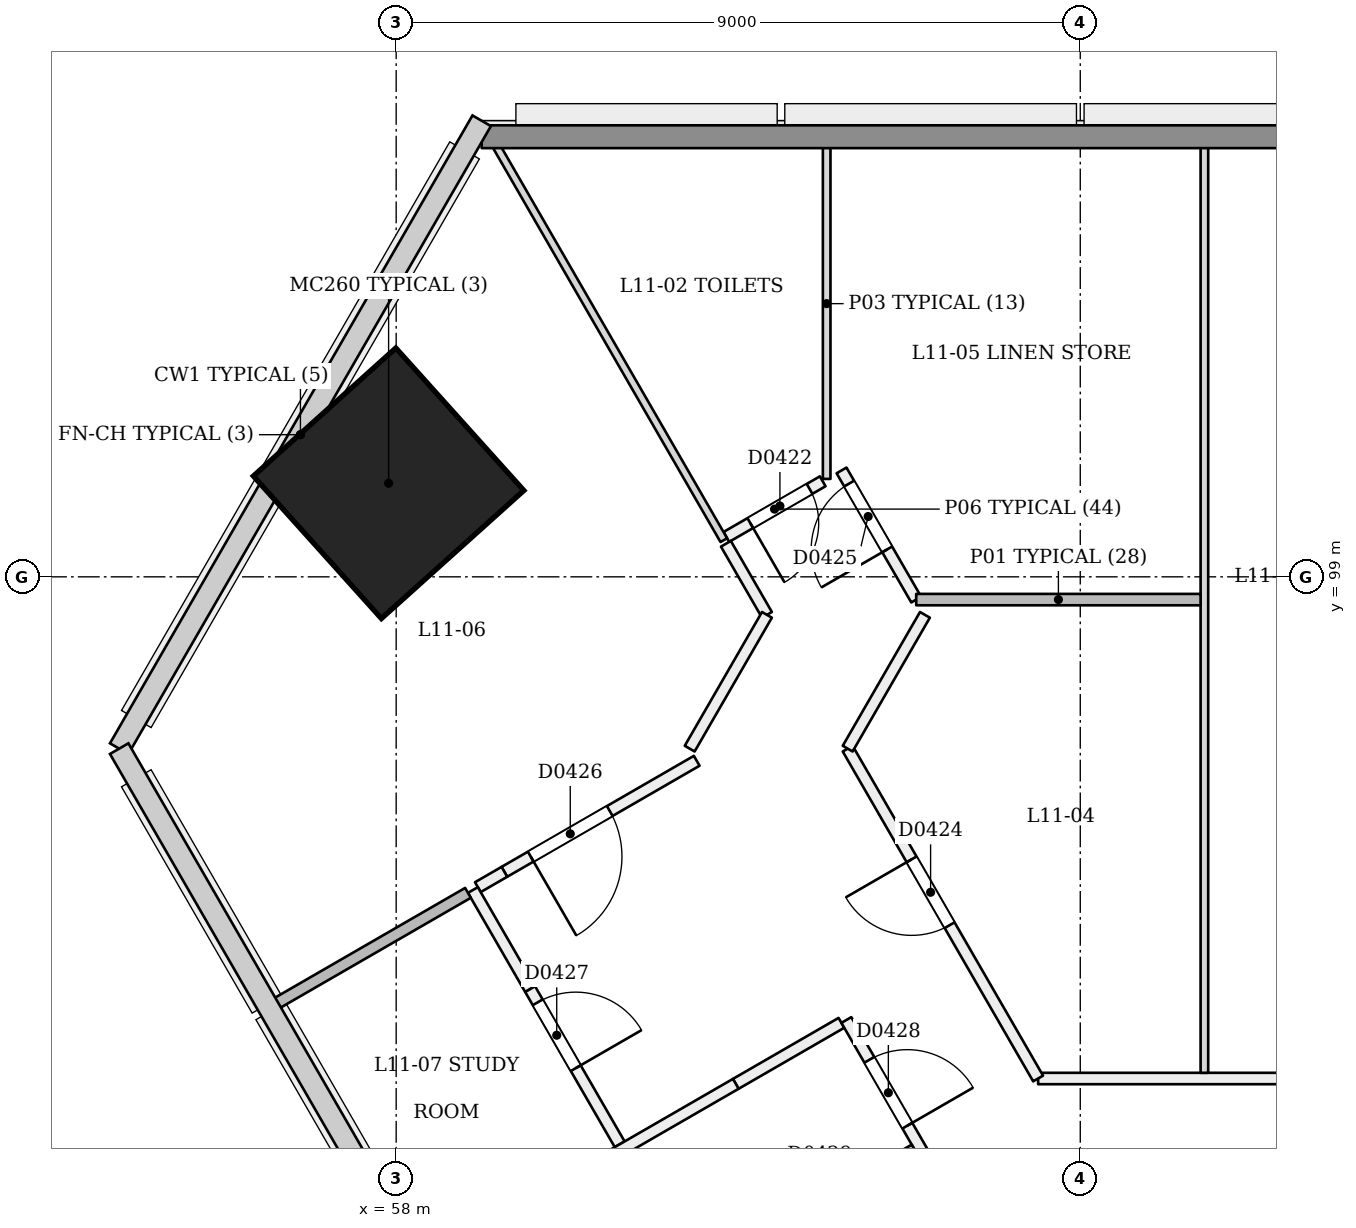
"""IFC4 building model, lengths in metres.
Left out: names, types, materials, properties, quantities, classifications, styles, units other than length and angle.
Written with IfcOpenShell. Run it as: python <this file> out.ifc"""

import sys

from ifc_helpers import new_model, si_unit, direction, frame, frame_2d, origin, origin_2d, place, context, subcontext, project, spatial, rectangle, extrude, element, fill, save


model = new_model("IFC4")
c1 = context("Model", 3, precision=1e-05, world=origin(), true_north=direction((0.0, 1.0)))
c2 = subcontext(c1, "Body", "Model", "MODEL_VIEW")
j1 = project(units=[si_unit("LENGTHUNIT", "METRE"), si_unit("PLANEANGLEUNIT", "RADIAN")], contexts=[c1])
p1 = place(None, origin())
s1 = spatial("IfcSite", under=j1, at=p1, CompositionType="ELEMENT")
p2 = place(p1, origin())
s2 = spatial("IfcBuilding", under=s1, at=p2, CompositionType="ELEMENT")
p3 = place(p2, frame((0.0, 0.0, 48.6)))
s3 = spatial("IfcBuildingStorey", under=s2, at=p3, CompositionType="ELEMENT", Elevation=48.6)
p4 = place(p3, frame((57.866, 100.22, 0.0), z_axis=(0.028403721265, 0.009287135593, 0.999553389135), x_axis=(-0.866197515162, 0.499302374824, 0.019975065005)))
e1 = element("IfcColumn", 1, at=p4, inside=s3, PredefinedType="COLUMN", context=c2, shape_type="SweptSolid", body=[
    extrude(rectangle(XDim=2.52, YDim=2.52, at=origin_2d()), origin(), (0.0, 0.0, 1.0), 3.602),
])
p5 = place(p3, frame((63.612, 100.257, 0.0), z_axis=(0.0, 0.0, 1.0), x_axis=(-0.866038398192, -0.499977492351, 0.0)))
e2 = element("IfcWall", 2, at=p5, inside=s3, PredefinedType="PARTITIONING", context=c2, shape_type="SweptSolid", body=[
    extrude(rectangle(XDim=1.464, YDim=0.15, at=frame_2d((0.732, 0.0))), origin(), (0.0, 0.0, 1.0), 3.1),
])
p6 = place(p5, frame((0.2, 0.0, 0.0)))
e3 = element("IfcOpeningElement", 3, at=p6, cuts=e2, PredefinedType="OPENING", context=c2, shape_type="SweptSolid", body=[
    extrude(rectangle(XDim=0.9, YDim=2.1, at=frame_2d((0.45, 1.05))), frame((0.0, 0.085, 0.0), z_axis=(0.0, -1.0, 0.0), x_axis=(1.0, 0.0, 0.0)), (0.0, 0.0, 1.0), 0.171),
])
p7 = place(p3, frame((70.125, 92.4, 0.0), z_axis=(0.0, 0.0, 1.0), x_axis=(-1.0, 0.0, 0.0)))
e4 = element("IfcWall", 4, at=p7, inside=s3, PredefinedType="PARTITIONING", context=c2, shape_type="SweptSolid", body=[
    extrude(rectangle(XDim=3.679, YDim=0.15, at=frame_2d((1.84, 0.0))), origin(), (0.0, 0.0, 1.0), 3.1),
])
p8 = place(p3, frame((66.446, 92.4, 0.0), z_axis=(0.0, 0.0, 1.0), x_axis=(-0.500000789788, 0.8660249478, 0.0)))
e5 = element("IfcWall", 5, at=p8, inside=s3, PredefinedType="PARTITIONING", context=c2, shape_type="SweptSolid", body=[
    extrude(rectangle(XDim=5.011, YDim=0.15, at=frame_2d((2.506, 0.0))), origin(), (0.0, 0.0, 1.0), 3.1),
])
p9 = place(p8, frame((2.329, 0.0, 0.0)))
e6 = element("IfcOpeningElement", 6, at=p9, cuts=e5, PredefinedType="OPENING", context=c2, shape_type="SweptSolid", body=[
    extrude(rectangle(XDim=1.0, YDim=2.1, at=frame_2d((0.5, 1.05))), frame((0.0, 0.085, 0.0), z_axis=(0.0, -1.0, 0.0), x_axis=(1.0, 0.0, 0.0)), (0.0, 0.0, 1.0), 0.171),
])
p10 = place(p3, frame((63.94, 96.74, 0.0), z_axis=(0.0, 0.0, 1.0), x_axis=(0.50002743572, 0.866009563185, 0.0)))
e7 = element("IfcWall", 7, at=p10, inside=s3, PredefinedType="PARTITIONING", context=c2, shape_type="SweptSolid", body=[
    extrude(rectangle(XDim=2.033, YDim=0.15, at=frame_2d((1.016, 0.0))), origin(), (0.0, 0.0, 1.0), 3.1),
])
p11 = place(p3, frame((64.842, 98.7, 0.0), z_axis=(0.0, 0.0, 1.0), x_axis=(-0.500379133502, 0.865806400274, 0.0)))
e8 = element("IfcWall", 8, at=p11, inside=s3, PredefinedType="PARTITIONING", context=c2, shape_type="SweptSolid", body=[
    extrude(rectangle(XDim=1.963, YDim=0.15, at=frame_2d((0.981, 0.0))), origin(), (0.0, 0.0, 1.0), 3.1),
])
p12 = place(p11, frame((0.763, 0.0, 0.0)))
e9 = element("IfcOpeningElement", 9, at=p12, cuts=e8, PredefinedType="OPENING", context=c2, shape_type="SweptSolid", body=[
    extrude(rectangle(XDim=1.0, YDim=2.1, at=frame_2d((0.5, 1.05))), frame((0.0, 0.085, 0.0), z_axis=(0.0, -1.0, 0.0), x_axis=(1.0, 0.0, 0.0)), (0.0, 0.0, 1.0), 0.171),
])
p13 = place(p3, frame((62.338, 99.435, 0.0), z_axis=(0.0, 0.0, 1.0), x_axis=(0.499957341738, -0.866050031143, 0.0)))
e10 = element("IfcWall", 10, at=p13, inside=s3, PredefinedType="PARTITIONING", context=c2, shape_type="SweptSolid", body=[
    extrude(rectangle(XDim=1.08, YDim=0.15, at=frame_2d((0.54, 0.0))), origin(), (0.0, 0.0, 1.0), 3.1),
])
p14 = place(p3, frame((62.878, 98.5, 0.0), z_axis=(0.0, 0.0, 1.0), x_axis=(-0.50002743572, -0.866009563185, 0.0)))
e11 = element("IfcWall", 11, at=p14, inside=s3, PredefinedType="PARTITIONING", context=c2, shape_type="SweptSolid", body=[
    extrude(rectangle(XDim=2.033, YDim=0.15, at=frame_2d((1.016, 0.0))), origin(), (0.0, 0.0, 1.0), 3.1),
])
p15 = place(p3, frame((61.954, 96.58, 0.0), z_axis=(0.0, 0.0, 1.0), x_axis=(-0.866013036001, -0.500021421018, 0.0)))
e12 = element("IfcWall", 12, at=p15, inside=s3, PredefinedType="PARTITIONING", context=c2, shape_type="SweptSolid", body=[
    extrude(rectangle(XDim=2.922, YDim=0.15, at=frame_2d((1.461, 0.0))), origin(), (0.0, 0.0, 1.0), 3.1),
])
p16 = place(p15, frame((1.321, 0.0, 0.0)))
e13 = element("IfcOpeningElement", 13, at=p16, cuts=e12, PredefinedType="OPENING", context=c2, shape_type="SweptSolid", body=[
    extrude(rectangle(XDim=1.2, YDim=2.1, at=frame_2d((0.6, 1.05))), frame((0.0, 0.085, 0.0), z_axis=(0.0, -1.0, 0.0), x_axis=(1.0, 0.0, 0.0)), (0.0, 0.0, 1.0), 0.171),
])
p17 = place(p3, frame((59.424, 95.119, 0.0), z_axis=(0.0, 0.0, 1.0), x_axis=(-0.866074730264, -0.499914554297, 0.0)))
e14 = element("IfcWall", 14, at=p17, inside=s3, PredefinedType="PARTITIONING", context=c2, shape_type="SweptSolid", body=[
    extrude(rectangle(XDim=0.403, YDim=0.15, at=frame_2d((0.202, 0.0))), origin(), (0.0, 0.0, 1.0), 2.6),
])
p18 = place(p3, frame((59.009, 94.88, 0.0), z_axis=(0.0, 0.0, 1.0), x_axis=(0.500045262687, -0.865999269783, 0.0)))
e15 = element("IfcWall", 15, at=p18, inside=s3, PredefinedType="PARTITIONING", context=c2, shape_type="SweptSolid", body=[
    extrude(rectangle(XDim=1.506, YDim=0.15, at=frame_2d((0.753, 0.0))), origin(), (0.0, 0.0, 1.0), 2.6),
])
p19 = place(p3, frame((59.762, 93.576, 0.0), z_axis=(0.0, 0.0, 1.0), x_axis=(0.500027327967, -0.8660096254, 0.0)))
e16 = element("IfcWall", 16, at=p19, inside=s3, PredefinedType="PARTITIONING", context=c2, shape_type="SweptSolid", body=[
    extrude(rectangle(XDim=2.357, YDim=0.15, at=frame_2d((1.178, 0.0))), origin(), (0.0, 0.0, 1.0), 3.1),
])
p20 = place(p19, frame((0.2, 0.0, 0.0)))
e17 = element("IfcOpeningElement", 17, at=p20, cuts=e16, PredefinedType="OPENING", context=c2, shape_type="SweptSolid", body=[
    extrude(rectangle(XDim=1.0, YDim=2.1, at=frame_2d((0.5, 1.05))), frame((0.0, 0.085, 0.0), z_axis=(0.0, -1.0, 0.0), x_axis=(1.0, 0.0, 0.0)), (0.0, 0.0, 1.0), 0.171),
])
p21 = place(p3, frame((62.468, 92.33, 0.0), z_axis=(0.0, 0.0, 1.0), x_axis=(0.866053882819, 0.499950669621, 0.0)))
e18 = element("IfcWall", 18, at=p21, inside=s3, PredefinedType="PARTITIONING", context=c2, shape_type="SweptSolid", body=[
    extrude(rectangle(XDim=1.605, YDim=0.15, at=frame_2d((0.803, 0.0))), origin(), (0.0, 0.0, 1.0), 3.1),
])
p22 = place(p3, frame((63.923, 93.17, 0.0), z_axis=(0.0, 0.0, 1.0), x_axis=(0.500002225217, -0.866024119051, 0.0)))
e19 = element("IfcWall", 19, at=p22, inside=s3, PredefinedType="PARTITIONING", context=c2, shape_type="SweptSolid", body=[
    extrude(rectangle(XDim=38.6, YDim=0.15, at=frame_2d((19.3, 0.0))), origin(), (0.0, 0.0, 1.0), 2.7),
])
p23 = place(p22, frame((0.605, 0.0, 0.0)))
e20 = element("IfcOpeningElement", 20, at=p23, cuts=e19, PredefinedType="OPENING", context=c2, shape_type="SweptSolid", body=[
    extrude(rectangle(XDim=1.0, YDim=2.1, at=frame_2d((0.5, 1.05))), frame((0.0, 0.085, 0.0), z_axis=(0.0, -1.0, 0.0), x_axis=(1.0, 0.0, 0.0)), (0.0, 0.0, 1.0), 0.171),
])
p24 = place(p22, frame((7.28, 0.0, 0.0)))
e21 = element("IfcOpeningElement", 21, at=p24, cuts=e19, PredefinedType="OPENING", context=c2, shape_type="SweptSolid", body=[
    extrude(rectangle(XDim=1.0, YDim=2.1, at=frame_2d((0.5, 1.05))), frame((0.0, 0.085, 0.0), z_axis=(0.0, -1.0, 0.0), x_axis=(1.0, 0.0, 0.0)), (0.0, 0.0, 1.0), 0.171),
])
p25 = place(p22, frame((9.72, 0.0, 0.0)))
e22 = element("IfcOpeningElement", 22, at=p25, cuts=e19, PredefinedType="OPENING", context=c2, shape_type="SweptSolid", body=[
    extrude(rectangle(XDim=1.0, YDim=2.1, at=frame_2d((0.5, 1.05))), frame((0.0, 0.085, 0.0), z_axis=(0.0, -1.0, 0.0), x_axis=(1.0, 0.0, 0.0)), (0.0, 0.0, 1.0), 0.171),
])
p26 = place(p22, frame((16.395, 0.0, 0.0)))
e23 = element("IfcOpeningElement", 23, at=p26, cuts=e19, PredefinedType="OPENING", context=c2, shape_type="SweptSolid", body=[
    extrude(rectangle(XDim=1.0, YDim=2.1, at=frame_2d((0.5, 1.05))), frame((0.0, 0.085, 0.0), z_axis=(0.0, -1.0, 0.0), x_axis=(1.0, 0.0, 0.0)), (0.0, 0.0, 1.0), 0.171),
])
p27 = place(p22, frame((18.72, 0.0, 0.0)))
e24 = element("IfcOpeningElement", 24, at=p27, cuts=e19, PredefinedType="OPENING", context=c2, shape_type="SweptSolid", body=[
    extrude(rectangle(XDim=1.0, YDim=2.1, at=frame_2d((0.5, 1.05))), frame((0.0, 0.085, 0.0), z_axis=(0.0, -1.0, 0.0), x_axis=(1.0, 0.0, 0.0)), (0.0, 0.0, 1.0), 0.171),
])
p28 = place(p22, frame((25.395, 0.0, 0.0)))
e25 = element("IfcOpeningElement", 25, at=p28, cuts=e19, PredefinedType="OPENING", context=c2, shape_type="SweptSolid", body=[
    extrude(rectangle(XDim=1.0, YDim=2.1, at=frame_2d((0.5, 1.05))), frame((0.0, 0.085, 0.0), z_axis=(0.0, -1.0, 0.0), x_axis=(1.0, 0.0, 0.0)), (0.0, 0.0, 1.0), 0.171),
])
p29 = place(p22, frame((27.605, 0.0, 0.0)))
e26 = element("IfcOpeningElement", 26, at=p29, cuts=e19, PredefinedType="OPENING", context=c2, shape_type="SweptSolid", body=[
    extrude(rectangle(XDim=1.0, YDim=2.1, at=frame_2d((0.5, 1.05))), frame((0.0, 0.085, 0.0), z_axis=(0.0, -1.0, 0.0), x_axis=(1.0, 0.0, 0.0)), (0.0, 0.0, 1.0), 0.171),
])
p30 = place(p22, frame((34.28, 0.0, 0.0)))
e27 = element("IfcOpeningElement", 27, at=p30, cuts=e19, PredefinedType="OPENING", context=c2, shape_type="SweptSolid", body=[
    extrude(rectangle(XDim=1.0, YDim=2.1, at=frame_2d((0.5, 1.05))), frame((0.0, 0.085, 0.0), z_axis=(0.0, -1.0, 0.0), x_axis=(1.0, 0.0, 0.0)), (0.0, 0.0, 1.0), 0.171),
])
p31 = place(p22, frame((37.342, 0.0, 0.0)))
e28 = element("IfcOpeningElement", 28, at=p31, cuts=e19, PredefinedType="OPENING", context=c2, shape_type="SweptSolid", body=[
    extrude(rectangle(XDim=1.0, YDim=2.1, at=frame_2d((0.5, 1.05))), frame((0.0, 0.085, 0.0), z_axis=(0.0, -1.0, 0.0), x_axis=(1.0, 0.0, 0.0)), (0.0, 0.0, 1.0), 0.171),
])
p32 = place(p3, frame((63.664, 100.288, 0.0), z_axis=(0.0, 0.0, 1.0), x_axis=(0.0, 1.0, 0.0)))
e29 = element("IfcWall", 29, at=p32, inside=s3, PredefinedType="PARTITIONING", context=c2, shape_type="SweptSolid", body=[
    extrude(rectangle(XDim=4.612, YDim=0.1, at=frame_2d((2.306, 0.0))), origin(), (0.0, 0.0, 1.0), 2.6),
])
p33 = place(p3, frame((59.183, 104.9, 0.0), z_axis=(0.0, 0.0, 1.0), x_axis=(0.500005118993, -0.866022448312, 0.0)))
e30 = element("IfcWall", 30, at=p33, inside=s3, PredefinedType="PARTITIONING", context=c2, shape_type="SweptSolid", body=[
    extrude(rectangle(XDim=6.255, YDim=0.1, at=frame_2d((3.128, 0.0))), origin(), (0.0, 0.0, 1.0), 2.6),
])
p34 = place(p3, frame((68.633, 104.9, 0.0), z_axis=(0.0, 0.0, 1.0), x_axis=(0.0, -1.0, 0.0)))
e31 = element("IfcWall", 31, at=p34, inside=s3, PredefinedType="PARTITIONING", context=c2, shape_type="SweptSolid", body=[
    extrude(rectangle(XDim=12.425, YDim=0.1, at=frame_2d((6.212, 0.0))), origin(), (0.0, 0.0, 1.0), 2.6),
])
p35 = place(p3, frame((68.583, 98.7, 0.0), z_axis=(0.0, 0.0, 1.0), x_axis=(-1.0, 0.0, 0.0)))
e32 = element("IfcWall", 32, at=p35, inside=s3, PredefinedType="PARTITIONING", context=c2, shape_type="SweptSolid", body=[
    extrude(rectangle(XDim=3.741, YDim=0.15, at=frame_2d((1.871, 0.0))), origin(), (0.0, 0.0, 1.0), 3.1),
])
p36 = place(p3, frame((56.394, 93.37, 0.0), z_axis=(0.0, 0.0, 1.0), x_axis=(0.866010265175, 0.500026219923, 0.0)))
e33 = element("IfcWall", 33, at=p36, inside=s3, PredefinedType="PARTITIONING", context=c2, shape_type="SweptSolid", body=[
    extrude(rectangle(XDim=2.945, YDim=0.15, at=frame_2d((1.473, 0.0))), origin(), (0.0, 0.0, 1.0), 2.6),
])
p37 = place(p3, frame((58.363, 89.96, 0.0), z_axis=(0.0, 0.0, 1.0), x_axis=(0.866015756104, 0.5000167099, 0.0)))
e34 = element("IfcWall", 34, at=p37, inside=s3, PredefinedType="PARTITIONING", context=c2, shape_type="SweptSolid", body=[
    extrude(rectangle(XDim=4.74, YDim=0.15, at=frame_2d((2.37, 0.0))), origin(), (0.0, 0.0, 1.0), 2.6),
])
p38 = place(p3, frame((62.274, 90.024, 0.0), z_axis=(0.0, 0.0, 1.0), x_axis=(0.86601045545, 0.500025890382, 0.0)))
e35 = element("IfcWall", 35, at=p38, inside=s3, PredefinedType="PARTITIONING", context=c2, shape_type="SweptSolid", body=[
    extrude(rectangle(XDim=2.925, YDim=0.1, at=frame_2d((1.462, 0.0))), origin(), (0.0, 0.0, 1.0), 3.1),
])
p39 = place(p38, frame((1.05, 0.0, 0.0)))
e36 = element("IfcOpeningElement", 36, at=p39, cuts=e35, PredefinedType="OPENING", context=c2, shape_type="SweptSolid", body=[
    extrude(rectangle(XDim=0.9, YDim=2.1, at=frame_2d((0.45, 1.05))), frame((0.0, 0.061, 0.0), z_axis=(0.0, -1.0, 0.0), x_axis=(1.0, 0.0, 0.0)), (0.0, 0.0, 1.0), 0.121),
])
p40 = place(p3, frame((59.125, 104.79, 0.0), z_axis=(0.0, 0.0, 1.0), x_axis=(1.0, 0.0, 0.0)))
e37 = element("IfcWall", 37, at=p40, inside=s3, PredefinedType="SOLIDWALL", context=c2, shape_type="SweptSolid", body=[
    extrude(rectangle(XDim=51.75, YDim=0.3, at=frame_2d((25.875, 0.0))), origin(), (0.0, 0.0, 1.0), 2.6),
])
p41 = place(p6, origin())
e38 = element("IfcDoor", 38, at=p41, inside=s3, OperationType="SINGLE_SWING_RIGHT", PredefinedType="NOTDEFINED", context=c2, shape_type="SweptSolid", body=[
    extrude(rectangle(XDim=0.9, YDim=2.1, at=frame_2d((0.45, 1.05))), frame((0.0, 0.025, 0.0), z_axis=(0.0, -1.0, 0.0), x_axis=(1.0, 0.0, 0.0)), (0.0, 0.0, 1.0), 0.05),
])
fill(e3, e38)
p42 = place(p9, origin())
e39 = element("IfcDoor", 39, at=p42, inside=s3, OperationType="SINGLE_SWING_RIGHT", PredefinedType="NOTDEFINED", context=c2, shape_type="SweptSolid", body=[
    extrude(rectangle(XDim=1.0, YDim=2.1, at=frame_2d((0.5, 1.05))), frame((0.0, 0.025, 0.0), z_axis=(0.0, -1.0, 0.0), x_axis=(1.0, 0.0, 0.0)), (0.0, 0.0, 1.0), 0.05),
])
fill(e6, e39)
p43 = place(p12, origin())
e40 = element("IfcDoor", 40, at=p43, inside=s3, OperationType="SINGLE_SWING_LEFT", PredefinedType="NOTDEFINED", context=c2, shape_type="SweptSolid", body=[
    extrude(rectangle(XDim=1.0, YDim=2.1, at=frame_2d((0.5, 1.05))), frame((0.0, 0.025, 0.0), z_axis=(0.0, -1.0, 0.0), x_axis=(1.0, 0.0, 0.0)), (0.0, 0.0, 1.0), 0.05),
])
fill(e9, e40)
p44 = place(p16, origin())
e41 = element("IfcDoor", 41, at=p44, inside=s3, OperationType="SINGLE_SWING_RIGHT", PredefinedType="NOTDEFINED", context=c2, shape_type="SweptSolid", body=[
    extrude(rectangle(XDim=1.2, YDim=2.1, at=frame_2d((0.6, 1.05))), frame((0.0, 0.025, 0.0), z_axis=(0.0, -1.0, 0.0), x_axis=(1.0, 0.0, 0.0)), (0.0, 0.0, 1.0), 0.05),
])
fill(e13, e41)
p45 = place(p20, origin())
e42 = element("IfcDoor", 42, at=p45, inside=s3, OperationType="SINGLE_SWING_RIGHT", PredefinedType="NOTDEFINED", context=c2, shape_type="SweptSolid", body=[
    extrude(rectangle(XDim=1.0, YDim=2.1, at=frame_2d((0.5, 1.05))), frame((0.0, 0.025, 0.0), z_axis=(0.0, -1.0, 0.0), x_axis=(1.0, 0.0, 0.0)), (0.0, 0.0, 1.0), 0.05),
])
fill(e17, e42)
p46 = place(p23, origin())
e43 = element("IfcDoor", 43, at=p46, inside=s3, OperationType="SINGLE_SWING_RIGHT", PredefinedType="NOTDEFINED", context=c2, shape_type="SweptSolid", body=[
    extrude(rectangle(XDim=1.0, YDim=2.1, at=frame_2d((0.5, 1.05))), frame((0.0, 0.025, 0.0), z_axis=(0.0, -1.0, 0.0), x_axis=(1.0, 0.0, 0.0)), (0.0, 0.0, 1.0), 0.05),
])
fill(e20, e43)
save(model, sys.argv[1])
